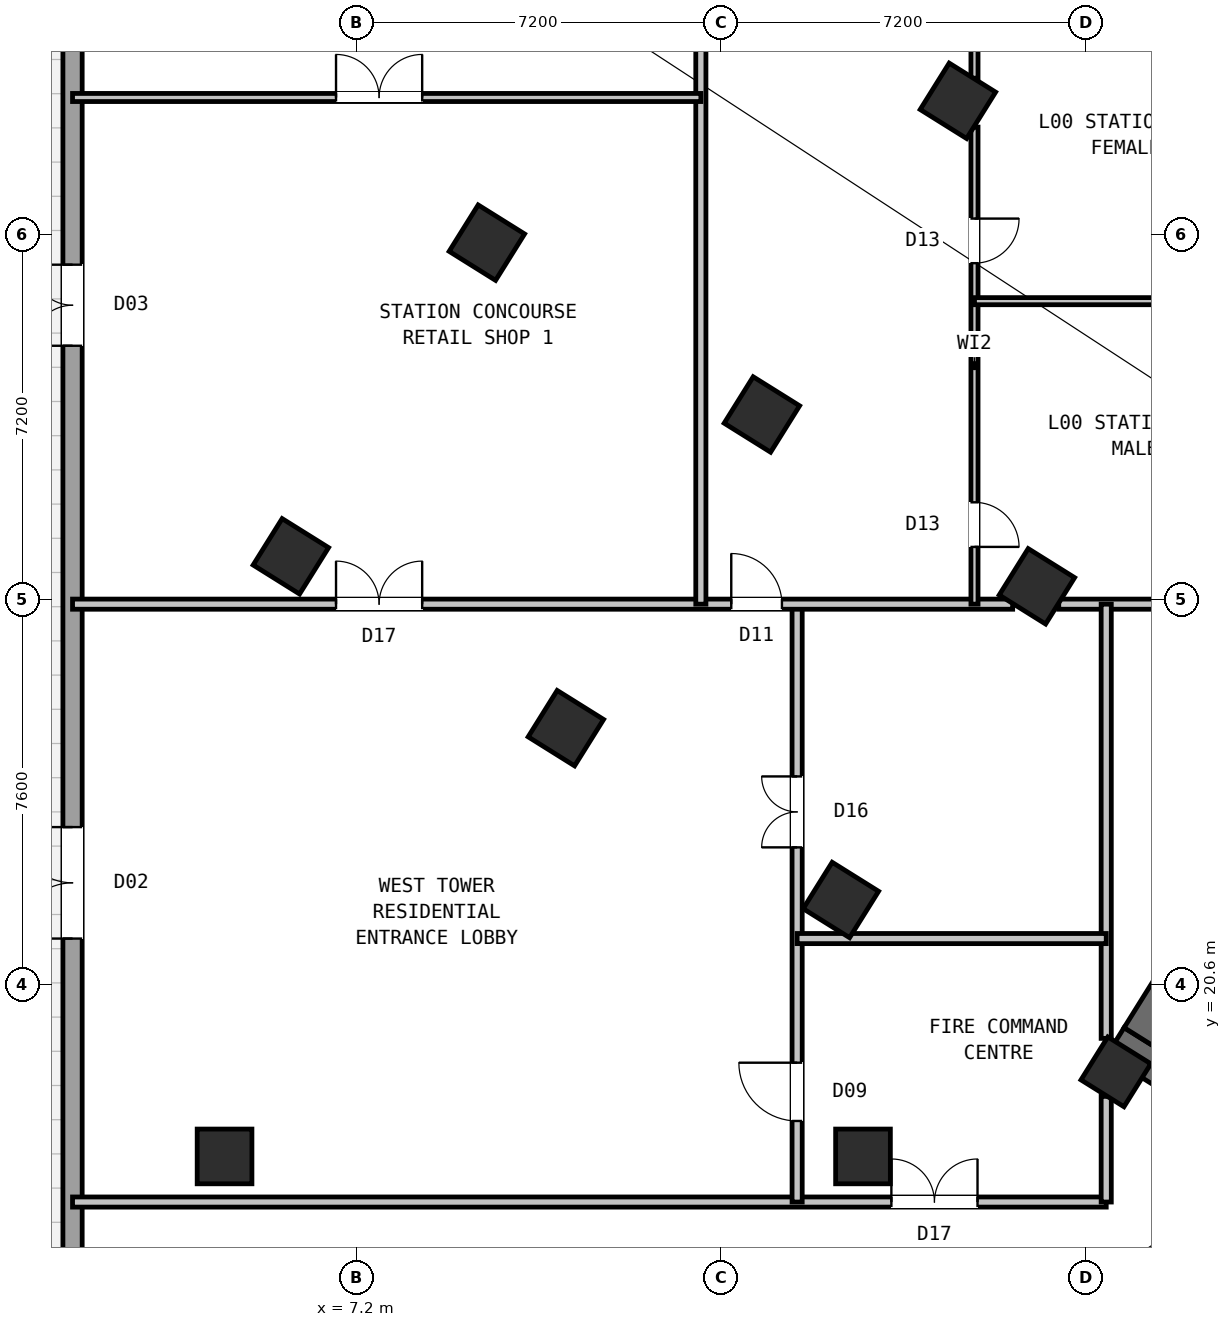
"""IFC4 building model, lengths in metres.
Left out: names, types, materials, properties, quantities, classifications, styles, units other than length and angle.
Written with IfcOpenShell. Run it as: python <this file> out.ifc"""

import sys

from ifc_helpers import new_model, si_unit, direction, frame, frame_2d, origin, origin_2d, place, context, subcontext, project, spatial, rectangle, hollow_rectangle, extrude, source, transform, mapped, element, fill, save


model = new_model("IFC4")
c1 = context("Model", 3, precision=1e-05, world=origin(), true_north=direction((0.0, 1.0)))
c2 = subcontext(c1, "Body", "Model", "MODEL_VIEW")
j1 = project(units=[si_unit("LENGTHUNIT", "METRE"), si_unit("PLANEANGLEUNIT", "RADIAN")], contexts=[c1])
p1 = place(None, origin())
s1 = spatial("IfcSite", under=j1, at=p1, CompositionType="ELEMENT")
p2 = place(p1, origin())
s2 = spatial("IfcBuilding", under=s1, at=p2, CompositionType="ELEMENT")
p3 = place(p2, origin())
s3 = spatial("IfcBuildingStorey", under=s2, at=p3, CompositionType="ELEMENT", Elevation=0.0)
p4 = place(p3, frame((33.409, 12.45, 0.0), z_axis=(0.0, 0.0, 1.0), x_axis=(-0.848051132073, 0.529914405721, 0.0)))
e1 = element("IfcWall", 1, at=p4, inside=s3, PredefinedType="SHEAR", context=c2, shape_type="SweptSolid", body=[
    extrude(rectangle(XDim=13.24, YDim=0.65, at=frame_2d((6.62, 0.0))), origin(), (0.0, 0.0, 1.0), 5.05),
])
p5 = place(p3, frame((26.007, 24.976, 0.0), z_axis=(0.0, 0.0, 1.0), x_axis=(-0.529916319127, -0.848049936456, 0.0)))
e2 = element("IfcWall", 2, at=p5, inside=s3, PredefinedType="SHEAR", context=c2, shape_type="SweptSolid", body=[
    extrude(rectangle(XDim=6.375, YDim=0.65, at=frame_2d((3.188, 0.0))), origin(), (0.0, 0.0, 1.0), 5.05),
])
m1 = source(origin(), c2, "Body", "SweptSolid", [
    extrude(hollow_rectangle(XDim=1.08, YDim=1.08, WallThickness=0.04, at=origin_2d()), origin(), (0.0, 0.0, 1.0), 5.4),
])
for number, where, z_axis, x_axis in (
    (3, (4.6, 17.2, 0.0), (0.0, 0.0, 1.0), (1.0, 0.0, 0.0)),
    (4, (17.2, 17.2, 0.0), (0.0, 0.0, 1.0), (1.0, 0.0, 0.0)),
    (5, (20.632, 28.452, 0.0), (0.0, 0.0, 1.0), (-0.848, 0.53, 0.0)),
    (6, (16.764, 22.261, 0.0), (0.0, 0.0, 1.0), (-0.848, 0.53, 0.0)),
    (7, (19.073, 38.034, 0.0), (0.0, 0.0, 1.0), (-0.848, 0.53, 0.0)),
    (8, (15.205, 31.844, 0.0), (0.0, 0.0, 1.0), (-0.848, 0.53, 0.0)),
    (9, (11.336, 25.653, 0.0), (0.0, 0.0, 1.0), (-0.848, 0.53, 0.0)),
    (10, (9.777, 35.235, 0.0), (0.0, 0.0, 1.0), (-0.848, 0.53, 0.0)),
    (11, (5.909, 29.044, 0.0), (0.0, 0.0, 1.0), (-0.848, 0.53, 0.0)),
):
    element("IfcColumn", number, at=place(p3, frame(where, z_axis=z_axis, x_axis=x_axis)), inside=s3, PredefinedType="COLUMN", context=c2, shape_type="MappedRepresentation", body=[
        mapped(m1, transform((0.0, 0.0, 0.0), scale=1.0)),
    ])
m2 = source(origin(), c2, "Body", "SweptSolid", [
    extrude(hollow_rectangle(XDim=1.0, YDim=1.0, WallThickness=0.04, at=origin_2d()), origin(), (0.0, 0.0, 1.0), 5.4),
])
p6 = place(p3, frame((22.191, 18.87, 0.0), z_axis=(0.0, 0.0, 1.0), x_axis=(-0.848048096156, 0.529919264233, 0.0)))
e12 = element("IfcColumn", 12, at=p6, inside=s3, PredefinedType="COLUMN", context=c2, shape_type="MappedRepresentation", body=[
    mapped(m2, transform((0.0, 0.0, 0.0), scale=1.0)),
])
p7 = place(p3, frame((1.6, 4.883, 0.0), z_axis=(0.0, 0.0, 1.0), x_axis=(0.0, 1.0, 0.0)))
e13 = element("IfcWall", 13, at=p7, inside=s3, PredefinedType="STANDARD", context=c2, shape_type="SweptSolid", body=[
    extrude(rectangle(XDim=38.234, YDim=0.38, at=frame_2d((19.117, 0.0))), origin(), (0.0, 0.0, 1.0), 5.05),
])
p8 = place(p7, frame((16.617, 0.0, 0.0)))
e14 = element("IfcOpeningElement", 14, at=p8, cuts=e13, PredefinedType="OPENING", context=c2, shape_type="SweptSolid", body=[
    extrude(rectangle(XDim=2.2, YDim=2.6, at=frame_2d((1.1, 1.3))), frame((0.0, 0.2, 0.0), z_axis=(0.0, -1.0, 0.0), x_axis=(1.0, 0.0, 0.0)), (0.0, 0.0, 1.0), 0.4),
])
p9 = place(p7, frame((28.317, 0.0, 0.0)))
e15 = element("IfcOpeningElement", 15, at=p9, cuts=e13, PredefinedType="OPENING", context=c2, shape_type="SweptSolid", body=[
    extrude(rectangle(XDim=1.6, YDim=2.4, at=frame_2d((0.8, 1.2))), frame((0.0, 0.2, 0.0), z_axis=(0.0, -1.0, 0.0), x_axis=(1.0, 0.0, 0.0)), (0.0, 0.0, 1.0), 0.4),
])
p10 = place(p3, frame((1.6, 16.3, 0.0), z_axis=(0.0, 0.0, 1.0), x_axis=(1.0, 0.0, 0.0)))
e16 = element("IfcWall", 16, at=p10, inside=s3, PredefinedType="STANDARD", context=c2, shape_type="SweptSolid", body=[
    extrude(rectangle(XDim=20.4, YDim=0.2, at=frame_2d((10.2, 0.0))), origin(), (0.0, 0.0, 1.0), 5.04),
])
p11 = place(p10, frame((16.16, 0.0, 0.0)))
e17 = element("IfcOpeningElement", 17, at=p11, cuts=e16, PredefinedType="OPENING", context=c2, shape_type="SweptSolid", body=[
    extrude(rectangle(XDim=1.7, YDim=2.2, at=frame_2d((0.85, 1.1))), frame((0.0, 0.11, 0.0), z_axis=(0.0, -1.0, 0.0), x_axis=(1.0, 0.0, 0.0)), (0.0, 0.0, 1.0), 0.22),
])
p12 = place(p3, frame((15.9, 16.3, 0.0), z_axis=(0.0, 0.0, 1.0), x_axis=(0.0, 1.0, 0.0)))
e18 = element("IfcWall", 18, at=p12, inside=s3, PredefinedType="STANDARD", context=c2, shape_type="SweptSolid", body=[
    extrude(rectangle(XDim=11.8, YDim=0.2, at=frame_2d((5.9, 0.0))), origin(), (0.0, 0.0, 1.0), 5.04),
])
p13 = place(p12, frame((1.6, 0.0, 0.0)))
e19 = element("IfcOpeningElement", 19, at=p13, cuts=e18, PredefinedType="OPENING", context=c2, shape_type="SweptSolid", body=[
    extrude(rectangle(XDim=1.15, YDim=2.1, at=frame_2d((0.575, 1.05))), frame((0.0, 0.11, 0.0), z_axis=(0.0, -1.0, 0.0), x_axis=(1.0, 0.0, 0.0)), (0.0, 0.0, 1.0), 0.22),
])
p14 = place(p12, frame((7.0, 0.0, 0.0)))
e20 = element("IfcOpeningElement", 20, at=p14, cuts=e18, PredefinedType="OPENING", context=c2, shape_type="SweptSolid", body=[
    extrude(rectangle(XDim=1.4, YDim=2.15, at=frame_2d((0.7, 1.075))), frame((0.0, 0.11, 0.0), z_axis=(0.0, -1.0, 0.0), x_axis=(1.0, 0.0, 0.0)), (0.0, 0.0, 1.0), 0.22),
])
p15 = place(p3, frame((1.6, 28.1, 0.0), z_axis=(0.0, 0.0, 1.0), x_axis=(1.0, 0.0, 0.0)))
e21 = element("IfcWall", 21, at=p15, inside=s3, PredefinedType="STANDARD", context=c2, shape_type="SweptSolid", body=[
    extrude(rectangle(XDim=18.554, YDim=0.2, at=frame_2d((9.277, 0.0))), origin(), (0.0, 0.0, 1.0), 5.04),
])
p16 = place(p15, frame((5.2, 0.0, 0.0)))
e22 = element("IfcOpeningElement", 22, at=p16, cuts=e21, PredefinedType="OPENING", context=c2, shape_type="SweptSolid", body=[
    extrude(rectangle(XDim=1.7, YDim=2.2, at=frame_2d((0.85, 1.1))), frame((0.0, 0.11, 0.0), z_axis=(0.0, -1.0, 0.0), x_axis=(1.0, 0.0, 0.0)), (0.0, 0.0, 1.0), 0.22),
])
p17 = place(p15, frame((13.0, 0.0, 0.0)))
e23 = element("IfcOpeningElement", 23, at=p17, cuts=e21, PredefinedType="OPENING", context=c2, shape_type="SweptSolid", body=[
    extrude(rectangle(XDim=1.0, YDim=2.1, at=frame_2d((0.5, 1.05))), frame((0.0, 0.11, 0.0), z_axis=(0.0, -1.0, 0.0), x_axis=(1.0, 0.0, 0.0)), (0.0, 0.0, 1.0), 0.22),
])
p18 = place(p3, frame((21.063, 28.1, 0.0), z_axis=(0.0, 0.0, 1.0), x_axis=(1.0, 0.0, 0.0)))
e24 = element("IfcWall", 24, at=p18, inside=s3, PredefinedType="STANDARD", context=c2, shape_type="SweptSolid", body=[
    extrude(rectangle(XDim=4.537, YDim=0.2, at=frame_2d((2.269, 0.0))), origin(), (0.0, 0.0, 1.0), 5.04),
])
p19 = place(p3, frame((22.0, 16.3, 0.0), z_axis=(0.0, 0.0, 1.0), x_axis=(0.0, 1.0, 0.0)))
e25 = element("IfcWall", 25, at=p19, inside=s3, PredefinedType="STANDARD", context=c2, shape_type="SweptSolid", body=[
    extrude(rectangle(XDim=2.085, YDim=0.2, at=frame_2d((1.043, 0.0))), origin(), (0.0, 0.0, 1.0), 5.04),
])
p20 = place(p3, frame((22.0, 19.53, 0.0), z_axis=(0.0, 0.0, 1.0), x_axis=(0.0, 1.0, 0.0)))
e26 = element("IfcWall", 26, at=p20, inside=s3, PredefinedType="STANDARD", context=c2, shape_type="SweptSolid", body=[
    extrude(rectangle(XDim=8.57, YDim=0.2, at=frame_2d((4.285, 0.0))), origin(), (0.0, 0.0, 1.0), 5.04),
])
p21 = place(p3, frame((15.9, 21.5, 0.0), z_axis=(0.0, 0.0, 1.0), x_axis=(1.0, 0.0, 0.0)))
e27 = element("IfcWall", 27, at=p21, inside=s3, PredefinedType="STANDARD", context=c2, shape_type="SweptSolid", body=[
    extrude(rectangle(XDim=6.1, YDim=0.2, at=frame_2d((3.05, 0.0))), origin(), (0.0, 0.0, 1.0), 5.04),
])
p22 = place(p3, frame((14.0, 28.1, 0.0), z_axis=(0.0, 0.0, 1.0), x_axis=(0.0, 1.0, 0.0)))
e28 = element("IfcWall", 28, at=p22, inside=s3, PredefinedType="STANDARD", context=c2, shape_type="SweptSolid", body=[
    extrude(rectangle(XDim=12.852, YDim=0.2, at=frame_2d((6.426, 0.0))), origin(), (0.0, 0.0, 1.0), 5.04),
])
p23 = place(p3, frame((1.6, 38.1, 0.0), z_axis=(0.0, 0.0, 1.0), x_axis=(1.0, 0.0, 0.0)))
e29 = element("IfcWall", 29, at=p23, inside=s3, PredefinedType="PARTITIONING", context=c2, shape_type="SweptSolid", body=[
    extrude(rectangle(XDim=12.4, YDim=0.16, at=frame_2d((6.2, 0.0))), origin(), (0.0, 0.0, 1.0), 5.04),
])
p24 = place(p23, frame((5.2, 0.0, 0.0)))
e30 = element("IfcOpeningElement", 30, at=p24, cuts=e29, PredefinedType="OPENING", context=c2, shape_type="SweptSolid", body=[
    extrude(rectangle(XDim=1.7, YDim=2.2, at=frame_2d((0.85, 1.1))), frame((0.0, 0.09, 0.0), z_axis=(0.0, -1.0, 0.0), x_axis=(1.0, 0.0, 0.0)), (0.0, 0.0, 1.0), 0.18),
])
p25 = place(p3, frame((19.4, 28.1, 0.0), z_axis=(0.0, 0.0, 1.0), x_axis=(0.0, 1.0, 0.0)))
e31 = element("IfcWall", 31, at=p25, inside=s3, PredefinedType="PLUMBINGWALL", context=c2, shape_type="SweptSolid", body=[
    extrude(rectangle(XDim=9.416, YDim=0.14, at=frame_2d((4.708, 0.0))), origin(), (0.0, 0.0, 1.0), 5.04),
])
p26 = place(p25, frame((1.13, 0.0, 0.0)))
e32 = element("IfcOpeningElement", 32, at=p26, cuts=e31, PredefinedType="OPENING", context=c2, shape_type="SweptSolid", body=[
    extrude(rectangle(XDim=0.88, YDim=2.08, at=frame_2d((0.44, 1.04))), frame((0.0, 0.08, 0.0), z_axis=(0.0, -1.0, 0.0), x_axis=(1.0, 0.0, 0.0)), (0.0, 0.0, 1.0), 0.16),
])
p27 = place(p25, frame((6.73, 0.0, 0.0)))
e33 = element("IfcOpeningElement", 33, at=p27, cuts=e31, PredefinedType="OPENING", context=c2, shape_type="SweptSolid", body=[
    extrude(rectangle(XDim=0.88, YDim=2.08, at=frame_2d((0.44, 1.04))), frame((0.0, 0.08, 0.0), z_axis=(0.0, -1.0, 0.0), x_axis=(1.0, 0.0, 0.0)), (0.0, 0.0, 1.0), 0.16),
])
p28 = place(p3, frame((19.4, 38.481, 0.0), z_axis=(0.0, 0.0, 1.0), x_axis=(0.0, 1.0, 0.0)))
e34 = element("IfcWall", 34, at=p28, inside=s3, PredefinedType="PLUMBINGWALL", context=c2, shape_type="SweptSolid", body=[
    extrude(rectangle(XDim=7.919, YDim=0.14, at=frame_2d((3.959, 0.0))), origin(), (0.0, 0.0, 1.0), 5.04),
])
p29 = place(p28, frame((2.249, 0.0, 0.0)))
e35 = element("IfcOpeningElement", 35, at=p29, cuts=e34, PredefinedType="OPENING", context=c2, shape_type="SweptSolid", body=[
    extrude(rectangle(XDim=0.96, YDim=2.08, at=frame_2d((0.48, 1.04))), frame((0.0, 0.08, 0.0), z_axis=(0.0, -1.0, 0.0), x_axis=(1.0, 0.0, 0.0)), (0.0, 0.0, 1.0), 0.16),
])
p30 = place(p28, frame((5.749, 0.0, 0.0)))
e36 = element("IfcOpeningElement", 36, at=p30, cuts=e34, PredefinedType="OPENING", context=c2, shape_type="SweptSolid", body=[
    extrude(rectangle(XDim=0.88, YDim=2.08, at=frame_2d((0.44, 1.04))), frame((0.0, 0.08, 0.0), z_axis=(0.0, -1.0, 0.0), x_axis=(1.0, 0.0, 0.0)), (0.0, 0.0, 1.0), 0.16),
])
p31 = place(p3, frame((19.4, 34.08, 0.0), z_axis=(0.0, 0.0, 1.0), x_axis=(1.0, 0.0, 0.0)))
e37 = element("IfcWall", 37, at=p31, inside=s3, PredefinedType="PLUMBINGWALL", context=c2, shape_type="SweptSolid", body=[
    extrude(rectangle(XDim=4.96, YDim=0.14, at=frame_2d((2.48, 0.0))), origin(), (0.0, 0.0, 1.0), 5.04),
])
m3 = source(origin(), c2, "Body", "SweptSolid", [
    extrude(rectangle(XDim=2.2, YDim=2.6, at=frame_2d((1.1, 1.3))), frame((0.0, 0.025, 0.0), z_axis=(0.0, -1.0, 0.0), x_axis=(1.0, 0.0, 0.0)), (0.0, 0.0, 1.0), 0.05),
])
p32 = place(p8, origin())
e38 = element("IfcDoor", 38, at=p32, inside=s3, OperationType="DOUBLE_DOOR_SINGLE_SWING", PredefinedType="DOOR", context=c2, shape_type="MappedRepresentation", body=[
    mapped(m3, transform((0.0, 0.0, 0.0), scale=1.0)),
])
fill(e14, e38)
m4 = source(origin(), c2, "Body", "SweptSolid", [
    extrude(rectangle(XDim=1.6, YDim=2.4, at=frame_2d((0.8, 1.2))), frame((0.0, 0.025, 0.0), z_axis=(0.0, -1.0, 0.0), x_axis=(1.0, 0.0, 0.0)), (0.0, 0.0, 1.0), 0.05),
])
p33 = place(p9, origin())
e39 = element("IfcDoor", 39, at=p33, inside=s3, OperationType="DOUBLE_DOOR_SINGLE_SWING", PredefinedType="DOOR", context=c2, shape_type="MappedRepresentation", body=[
    mapped(m4, transform((0.0, 0.0, 0.0), scale=1.0)),
])
fill(e15, e39)
m5 = source(origin(), c2, "Body", "SweptSolid", [
    extrude(rectangle(XDim=1.7, YDim=2.2, at=frame_2d((0.85, 1.1))), frame((0.0, 0.025, 0.0), z_axis=(0.0, -1.0, 0.0), x_axis=(1.0, 0.0, 0.0)), (0.0, 0.0, 1.0), 0.05),
])
p34 = place(p11, origin())
e40 = element("IfcDoor", 40, at=p34, inside=s3, OperationType="DOUBLE_DOOR_SINGLE_SWING", PredefinedType="DOOR", context=c2, shape_type="MappedRepresentation", body=[
    mapped(m5, transform((0.0, 0.0, 0.0), scale=1.0)),
])
fill(e17, e40)
m6 = source(origin(), c2, "Body", "SweptSolid", [
    extrude(rectangle(XDim=1.15, YDim=2.1, at=frame_2d((0.575, 1.05))), frame((0.0, 0.025, 0.0), z_axis=(0.0, -1.0, 0.0), x_axis=(1.0, 0.0, 0.0)), (0.0, 0.0, 1.0), 0.05),
])
p35 = place(p13, origin())
e41 = element("IfcDoor", 41, at=p35, inside=s3, OperationType="SINGLE_SWING_RIGHT", PredefinedType="DOOR", context=c2, shape_type="MappedRepresentation", body=[
    mapped(m6, transform((0.0, 0.0, 0.0), scale=1.0)),
])
fill(e19, e41)
m7 = source(origin(), c2, "Body", "SweptSolid", [
    extrude(rectangle(XDim=1.4, YDim=2.15, at=frame_2d((0.7, 1.075))), frame((0.0, 0.025, 0.0), z_axis=(0.0, -1.0, 0.0), x_axis=(1.0, 0.0, 0.0)), (0.0, 0.0, 1.0), 0.05),
])
p36 = place(p14, origin())
e42 = element("IfcDoor", 42, at=p36, inside=s3, OperationType="DOUBLE_DOOR_SINGLE_SWING", PredefinedType="DOOR", context=c2, shape_type="MappedRepresentation", body=[
    mapped(m7, transform((0.0, 0.0, 0.0), scale=1.0)),
])
fill(e20, e42)
p37 = place(p16, origin())
e43 = element("IfcDoor", 43, at=p37, inside=s3, OperationType="DOUBLE_DOOR_SINGLE_SWING", PredefinedType="DOOR", context=c2, shape_type="MappedRepresentation", body=[
    mapped(m5, transform((0.0, 0.0, 0.0), scale=1.0)),
])
fill(e22, e43)
p38 = place(p24, origin())
e44 = element("IfcDoor", 44, at=p38, inside=s3, OperationType="DOUBLE_DOOR_SINGLE_SWING", PredefinedType="DOOR", context=c2, shape_type="MappedRepresentation", body=[
    mapped(m5, transform((0.0, 0.0, 0.0), scale=1.0)),
])
fill(e30, e44)
m8 = source(origin(), c2, "Body", "SweptSolid", [
    extrude(rectangle(XDim=1.0, YDim=2.1, at=frame_2d((0.5, 1.05))), frame((0.0, 0.025, 0.0), z_axis=(0.0, -1.0, 0.0), x_axis=(1.0, 0.0, 0.0)), (0.0, 0.0, 1.0), 0.05),
])
p39 = place(p17, origin())
e45 = element("IfcDoor", 45, at=p39, inside=s3, OperationType="SINGLE_SWING_LEFT", PredefinedType="DOOR", context=c2, shape_type="MappedRepresentation", body=[
    mapped(m8, transform((0.0, 0.0, 0.0), scale=1.0)),
])
fill(e23, e45)
m9 = source(origin(), c2, "Body", "SweptSolid", [
    extrude(rectangle(XDim=0.88, YDim=2.08, at=frame_2d((0.44, 1.04))), frame((0.0, 0.025, 0.0), z_axis=(0.0, -1.0, 0.0), x_axis=(1.0, 0.0, 0.0)), (0.0, 0.0, 1.0), 0.05),
])
p40 = place(p26, frame((0.88, 0.0, 0.0), z_axis=(0.0, 0.0, 1.0), x_axis=(-1.0, 0.0, 0.0)))
e46 = element("IfcDoor", 46, at=p40, inside=s3, OperationType="SINGLE_SWING_RIGHT", PredefinedType="DOOR", context=c2, shape_type="MappedRepresentation", body=[
    mapped(m9, transform((0.0, 0.0, 0.0), scale=1.0)),
])
fill(e32, e46)
p41 = place(p27, frame((0.88, 0.0, 0.0), z_axis=(0.0, 0.0, 1.0), x_axis=(-1.0, 0.0, 0.0)))
e47 = element("IfcDoor", 47, at=p41, inside=s3, OperationType="SINGLE_SWING_LEFT", PredefinedType="DOOR", context=c2, shape_type="MappedRepresentation", body=[
    mapped(m9, transform((0.0, 0.0, 0.0), scale=1.0)),
])
fill(e33, e47)
save(model, sys.argv[1])
